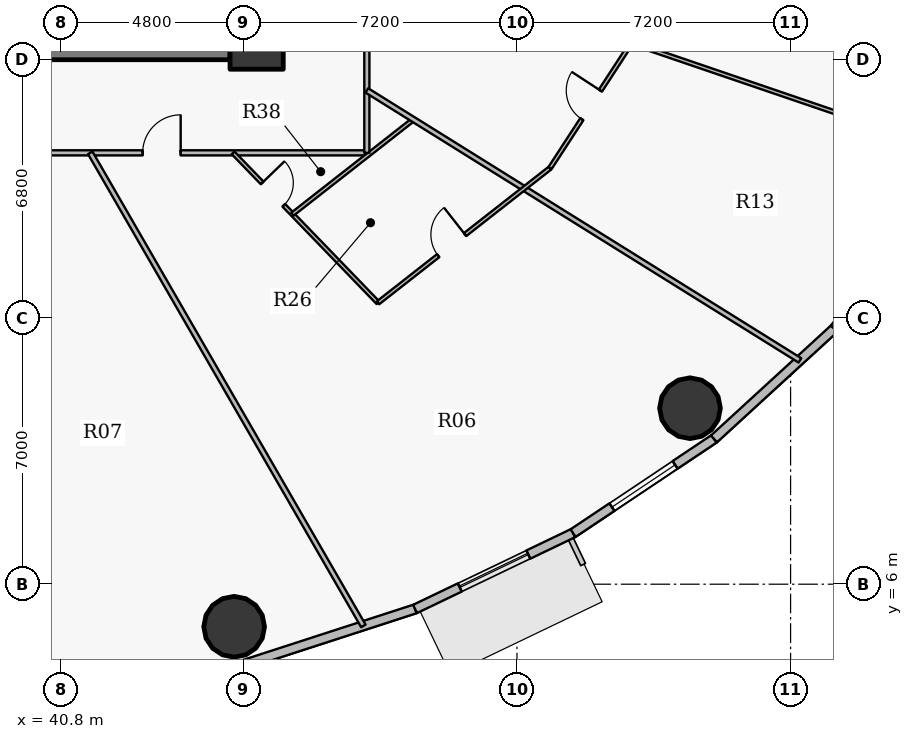
"""IFC4 building model, lengths in metres.
Left out: names, types, materials, properties, quantities, classifications, styles, units other than length and angle.
Written with IfcOpenShell. Run it as: python <this file> out.ifc"""

import sys

from ifc_helpers import new_model, si_unit, direction, frame, frame_2d, origin, origin_2d, place, context, subcontext, project, spatial, rectangle, hollow_circle, extrude, source, transform, mapped, element, fill, save


model = new_model("IFC4")
c1 = context("Model", 3, precision=1e-05, world=origin(), true_north=direction((0.0, 1.0)))
c2 = subcontext(c1, "Body", "Model", "MODEL_VIEW")
j1 = project(units=[si_unit("LENGTHUNIT", "METRE"), si_unit("PLANEANGLEUNIT", "RADIAN")], contexts=[c1])
p1 = place(None, origin())
s1 = spatial("IfcSite", under=j1, at=p1, CompositionType="ELEMENT")
p2 = place(p1, origin())
s2 = spatial("IfcBuilding", under=s1, at=p2, CompositionType="ELEMENT")
p3 = place(p2, frame((0.0, 0.0, 61.8)))
s3 = spatial("IfcBuildingStorey", under=s2, at=p3, CompositionType="ELEMENT", Elevation=61.8)
p4 = place(p3, frame((45.95, 20.25, 0.0), z_axis=(0.0, 0.0, 1.0), x_axis=(1.0, 0.0, 0.0)))
e1 = element("IfcColumn", 1, at=p4, inside=s3, PredefinedType="COLUMN", context=c2, shape_type="SweptSolid", body=[
    extrude(rectangle(XDim=1.4, YDim=1.4, at=origin_2d()), origin(), (0.0, 0.0, 1.0), 4.2),
])
p5 = place(p3, frame((45.25, 20.25, 0.0), z_axis=(0.0, 0.0, 1.0), x_axis=(-1.0, 0.0, 0.0)))
e2 = element("IfcWall", 2, at=p5, inside=s3, PredefinedType="SHEAR", context=c2, shape_type="SweptSolid", body=[
    extrude(rectangle(XDim=18.5, YDim=0.9, at=frame_2d((9.25, 0.0))), origin(), (0.0, 0.0, 1.0), 3.4),
])
p6 = place(p5, frame((10.0, 0.0, 0.0)))
e3 = element("IfcOpeningElement", 3, at=p6, cuts=e2, PredefinedType="OPENING", context=c2, shape_type="SweptSolid", body=[
    extrude(rectangle(XDim=1.15, YDim=2.15, at=origin_2d()), frame((0.575, 0.46, 1.075), z_axis=(0.0, -1.0, 0.0), x_axis=(1.0, 0.0, 0.0)), (0.0, 0.0, 1.0), 0.92),
])
for number, where, z_axis, x_axis in (
    (4, (45.358, 4.88, 0.0), (0.0, 0.0, 1.0), (1.0, 0.0, 0.0)),
    (5, (57.353, 10.631, 0.0), (0.0, 0.0, 1.0), (1.0, 0.0, 0.0)),
):
    element("IfcColumn", number, at=place(p3, frame(where, z_axis=z_axis, x_axis=x_axis)), inside=s3, PredefinedType="COLUMN", context=c2, shape_type="SweptSolid", body=[
        extrude(hollow_circle(Radius=0.8, WallThickness=0.045, at=origin_2d()), origin(), (0.0, 0.0, 1.0), 4.2),
    ])
p7 = place(p3, frame((50.118, 5.349, 0.0), z_axis=(0.0, 0.0, 1.0), x_axis=(-0.951207699013, -0.308551313946, 0.0)))
e6 = element("IfcWall", 6, at=p7, inside=s3, PredefinedType="SOLIDWALL", context=c2, shape_type="SweptSolid", body=[
    extrude(rectangle(XDim=4.739, YDim=0.24, at=frame_2d((2.369, 0.0))), origin(), (0.0, 0.0, 1.0), 3.95),
])
p8 = place(p3, frame((54.277, 7.344, 0.0), z_axis=(0.0, 0.0, 1.0), x_axis=(-0.901601503137, -0.432567601123, 0.0)))
e7 = element("IfcWall", 7, at=p8, inside=s3, PredefinedType="SOLIDWALL", context=c2, shape_type="SweptSolid", body=[
    extrude(rectangle(XDim=4.613, YDim=0.24, at=frame_2d((2.306, 0.0))), origin(), (0.0, 0.0, 1.0), 3.95),
])
p9 = place(p8, frame((1.307, 0.0, 0.9)))
e8 = element("IfcOpeningElement", 8, at=p9, cuts=e7, PredefinedType="OPENING", context=c2, shape_type="SweptSolid", body=[
    extrude(rectangle(XDim=2.0, YDim=1.75, at=origin_2d()), frame((1.0, 0.13, 0.875), z_axis=(0.0, -1.0, 0.0), x_axis=(1.0, 0.0, 0.0)), (0.0, 0.0, 1.0), 0.26),
])
p10 = place(p3, frame((57.985, 9.824, 0.0), z_axis=(0.0, 0.0, 1.0), x_axis=(-0.831240982525, -0.555912249343, 0.0)))
e9 = element("IfcWall", 9, at=p10, inside=s3, PredefinedType="SOLIDWALL", context=c2, shape_type="SweptSolid", body=[
    extrude(rectangle(XDim=4.46, YDim=0.24, at=frame_2d((2.23, 0.0))), origin(), (0.0, 0.0, 1.0), 3.95),
])
p11 = place(p10, frame((1.23, 0.0, 0.9)))
e10 = element("IfcOpeningElement", 10, at=p11, cuts=e9, PredefinedType="OPENING", context=c2, shape_type="SweptSolid", body=[
    extrude(rectangle(XDim=2.0, YDim=1.75, at=origin_2d()), frame((1.0, 0.13, 0.875), z_axis=(0.0, -1.0, 0.0), x_axis=(1.0, 0.0, 0.0)), (0.0, 0.0, 1.0), 0.26),
])
p12 = place(p3, frame((61.15, 12.725, 0.0), z_axis=(0.0, 0.0, 1.0), x_axis=(-0.737116376281, -0.67576582321, 0.0)))
e11 = element("IfcWall", 11, at=p12, inside=s3, PredefinedType="SOLIDWALL", context=c2, shape_type="SweptSolid", body=[
    extrude(rectangle(XDim=4.294, YDim=0.24, at=frame_2d((2.147, 0.0))), origin(), (0.0, 0.0, 1.0), 3.95),
])
p13 = place(p3, frame((63.695, 15.977, 0.0), z_axis=(0.0, 0.0, 1.0), x_axis=(-0.616295508253, -0.787514981767, 0.0)))
e12 = element("IfcWall", 12, at=p13, inside=s3, PredefinedType="SOLIDWALL", context=c2, shape_type="SweptSolid", body=[
    extrude(rectangle(XDim=4.129, YDim=0.24, at=frame_2d((2.065, 0.0))), origin(), (0.0, 0.0, 1.0), 3.95),
])
p14 = place(p13, frame((1.44, 0.0, 0.9)))
e13 = element("IfcOpeningElement", 13, at=p14, cuts=e12, PredefinedType="OPENING", context=c2, shape_type="SweptSolid", body=[
    extrude(rectangle(XDim=1.25, YDim=1.65, at=origin_2d()), frame((0.625, 0.13, 0.825), z_axis=(0.0, -1.0, 0.0), x_axis=(1.0, 0.0, 0.0)), (0.0, 0.0, 1.0), 0.26),
])
p15 = place(p3, frame((37.362, 17.35, 0.0), z_axis=(0.0, 0.0, 1.0), x_axis=(1.0, 0.0, 0.0)))
e14 = element("IfcWall", 14, at=p15, inside=s3, PredefinedType="PARTITIONING", context=c2, shape_type="SweptSolid", body=[
    extrude(rectangle(XDim=11.488, YDim=0.135, at=frame_2d((5.744, 0.0))), origin(), (0.0, 0.0, 1.0), 3.285),
])
p16 = place(p15, frame((1.625, 0.0, 0.0)))
e15 = element("IfcOpeningElement", 15, at=p16, cuts=e14, PredefinedType="OPENING", context=c2, shape_type="SweptSolid", body=[
    extrude(rectangle(XDim=1.0, YDim=2.15, at=origin_2d()), frame((0.5, 0.078, 1.075), z_axis=(0.0, -1.0, 0.0), x_axis=(1.0, 0.0, 0.0)), (0.0, 0.0, 1.0), 0.155),
])
p17 = place(p15, frame((5.589, 0.0, 0.0)))
e16 = element("IfcOpeningElement", 16, at=p17, cuts=e14, PredefinedType="OPENING", context=c2, shape_type="SweptSolid", body=[
    extrude(rectangle(XDim=1.0, YDim=2.15, at=origin_2d()), frame((0.5, 0.078, 1.075), z_axis=(0.0, -1.0, 0.0), x_axis=(1.0, 0.0, 0.0)), (0.0, 0.0, 1.0), 0.155),
])
p18 = place(p3, frame((41.572, 17.35, 0.0), z_axis=(0.0, 0.0, 1.0), x_axis=(0.499990052844, -0.866031146701, 0.0)))
e17 = element("IfcWall", 17, at=p18, inside=s3, PredefinedType="PARTITIONING", context=c2, shape_type="SweptSolid", body=[
    extrude(rectangle(XDim=14.373, YDim=0.135, at=frame_2d((7.187, 0.0))), origin(), (0.0, 0.0, 1.0), 3.335),
])
p19 = place(p3, frame((45.33, 17.35, 0.0), z_axis=(0.0, 0.0, 1.0), x_axis=(0.695082659364, -0.718929827348, 0.0)))
e18 = element("IfcWall", 18, at=p19, inside=s3, PredefinedType="PARTITIONING", context=c2, shape_type="SweptSolid", body=[
    extrude(rectangle(XDim=5.487, YDim=0.1, at=frame_2d((2.744, 0.0))), origin(), (0.0, 0.0, 1.0), 3.95),
])
p20 = place(p19, frame((1.1, 0.0, 0.0)))
e19 = element("IfcOpeningElement", 19, at=p20, cuts=e18, PredefinedType="OPENING", context=c2, shape_type="SweptSolid", body=[
    extrude(rectangle(XDim=0.82, YDim=2.1, at=origin_2d()), frame((0.41, 0.06, 1.05), z_axis=(0.0, -1.0, 0.0), x_axis=(1.0, 0.0, 0.0)), (0.0, 0.0, 1.0), 0.12),
])
p21 = place(p3, frame((46.891, 15.736, 0.0), z_axis=(0.0, 0.0, 1.0), x_axis=(0.787335515078, 0.61652476568, 0.0)))
e20 = element("IfcWall", 20, at=p21, inside=s3, PredefinedType="PARTITIONING", context=c2, shape_type="SweptSolid", body=[
    extrude(rectangle(XDim=4.043, YDim=0.1, at=frame_2d((2.022, 0.0))), origin(), (0.0, 0.0, 1.0), 3.285),
])
p22 = place(p3, frame((48.85, 17.35, 0.0), z_axis=(0.0, 0.0, 1.0), x_axis=(0.0, 1.0, 0.0)))
e21 = element("IfcWall", 21, at=p22, inside=s3, PredefinedType="PARTITIONING", context=c2, shape_type="SweptSolid", body=[
    extrude(rectangle(XDim=6.011, YDim=0.135, at=frame_2d((3.006, 0.0))), origin(), (0.0, 0.0, 1.0), 3.285),
])
p23 = place(p3, frame((48.85, 18.991, 0.0), z_axis=(0.0, 0.0, 1.0), x_axis=(0.848674864049, -0.528914903488, 0.0)))
e22 = element("IfcWall", 22, at=p23, inside=s3, PredefinedType="PARTITIONING", context=c2, shape_type="SweptSolid", body=[
    extrude(rectangle(XDim=13.427, YDim=0.135, at=frame_2d((6.714, 0.0))), origin(), (0.0, 0.0, 1.0), 3.335),
])
p24 = place(p3, frame((49.144, 13.405, 0.0), z_axis=(0.0, 0.0, 1.0), x_axis=(0.787337339938, 0.616522435228, 0.0)))
e23 = element("IfcWall", 23, at=p24, inside=s3, PredefinedType="PARTITIONING", context=c2, shape_type="SweptSolid", body=[
    extrude(rectangle(XDim=5.747, YDim=0.1, at=frame_2d((2.874, 0.0))), origin(), (0.0, 0.0, 1.0), 3.285),
])
p25 = place(p24, frame((2.01, 0.0, 0.0)))
e24 = element("IfcOpeningElement", 24, at=p25, cuts=e23, PredefinedType="OPENING", context=c2, shape_type="SweptSolid", body=[
    extrude(rectangle(XDim=0.9, YDim=2.1, at=origin_2d()), frame((0.45, 0.06, 1.05), z_axis=(0.0, -1.0, 0.0), x_axis=(1.0, 0.0, 0.0)), (0.0, 0.0, 1.0), 0.12),
])
p26 = place(p3, frame((53.669, 16.948, 0.0), z_axis=(0.0, 0.0, 1.0), x_axis=(0.545413765252, 0.8381669432, 0.0)))
e25 = element("IfcWall", 25, at=p26, inside=s3, PredefinedType="PARTITIONING", context=c2, shape_type="SweptSolid", body=[
    extrude(rectangle(XDim=5.688, YDim=0.1, at=frame_2d((2.844, 0.0))), origin(), (0.0, 0.0, 1.0), 3.285),
])
p27 = place(p26, frame((1.535, 0.0, 0.0)))
e26 = element("IfcOpeningElement", 26, at=p27, cuts=e25, PredefinedType="OPENING", context=c2, shape_type="SweptSolid", body=[
    extrude(rectangle(XDim=0.9, YDim=2.1, at=origin_2d()), frame((0.45, 0.06, 1.05), z_axis=(0.0, -1.0, 0.0), x_axis=(1.0, 0.0, 0.0)), (0.0, 0.0, 1.0), 0.12),
])
p28 = place(p3, frame((55.812, 20.242, 0.0), z_axis=(0.0, 0.0, 1.0), x_axis=(0.946449887069, -0.322850756955, 0.0)))
e27 = element("IfcWall", 27, at=p28, inside=s3, PredefinedType="PARTITIONING", context=c2, shape_type="SweptSolid", body=[
    extrude(rectangle(XDim=9.08, YDim=0.1, at=frame_2d((4.54, 0.0))), origin(), (0.0, 0.0, 1.0), 3.335),
])
p29 = place(p3, frame((45.26, 19.8, 0.0), z_axis=(0.0, 0.0, 1.0), x_axis=(1.0, 0.0, 0.0)))
e28 = element("IfcWall", 28, at=p29, inside=s3, PredefinedType="PARTITIONING", context=c2, shape_type="SweptSolid", body=[
    extrude(rectangle(XDim=1.14, YDim=0.135, at=frame_2d((0.57, 0.0))), origin(), (0.0, 0.0, 1.0), 3.285),
])
m1 = source(origin(), c2, "Body", "SweptSolid", [
    extrude(rectangle(XDim=2.0, YDim=1.75, at=origin_2d()), frame((1.0, 0.03, 0.875), z_axis=(0.0, -1.0, 0.0), x_axis=(1.0, 0.0, 0.0)), (0.0, 0.0, 1.0), 0.06),
])
p30 = place(p9, origin())
e29 = element("IfcWindow", 29, at=p30, inside=s3, PartitioningType="DOUBLE_PANEL_VERTICAL", PredefinedType="WINDOW", context=c2, shape_type="MappedRepresentation", body=[
    mapped(m1, transform((0.0, 0.0, 0.0), x_axis=(1.0, 0.0, 0.0), y_axis=(0.0, 1.0, 0.0), z_axis=(0.0, 0.0, 1.0), scale=1.0)),
])
fill(e8, e29)
p31 = place(p11, origin())
e30 = element("IfcWindow", 30, at=p31, inside=s3, PartitioningType="DOUBLE_PANEL_VERTICAL", PredefinedType="WINDOW", context=c2, shape_type="MappedRepresentation", body=[
    mapped(m1, transform((0.0, 0.0, 0.0), x_axis=(1.0, 0.0, 0.0), y_axis=(0.0, 1.0, 0.0), z_axis=(0.0, 0.0, 1.0), scale=1.0)),
])
fill(e10, e30)
m2 = source(origin(), c2, "Body", "SweptSolid", [
    extrude(rectangle(XDim=1.0, YDim=2.15, at=origin_2d()), frame((0.5, 0.025, 1.075), z_axis=(0.0, -1.0, 0.0), x_axis=(1.0, 0.0, 0.0)), (0.0, 0.0, 1.0), 0.05),
])
p32 = place(p17, origin())
e31 = element("IfcDoor", 31, at=p32, inside=s3, OperationType="SINGLE_SWING_RIGHT", PredefinedType="DOOR", context=c2, shape_type="MappedRepresentation", body=[
    mapped(m2, transform((0.0, 0.0, 0.0), x_axis=(1.0, 0.0, 0.0), y_axis=(0.0, 1.0, 0.0), z_axis=(0.0, 0.0, 1.0), scale=1.0)),
])
fill(e16, e31)
m3 = source(origin(), c2, "Body", "SweptSolid", [
    extrude(rectangle(XDim=0.82, YDim=2.1, at=origin_2d()), frame((0.41, 0.025, 1.05), z_axis=(0.0, -1.0, 0.0), x_axis=(1.0, 0.0, 0.0)), (0.0, 0.0, 1.0), 0.05),
])
p33 = place(p20, origin())
e32 = element("IfcDoor", 32, at=p33, inside=s3, OperationType="SINGLE_SWING_LEFT", PredefinedType="DOOR", context=c2, shape_type="MappedRepresentation", body=[
    mapped(m3, transform((0.0, 0.0, 0.0), x_axis=(1.0, 0.0, 0.0), y_axis=(0.0, 1.0, 0.0), z_axis=(0.0, 0.0, 1.0), scale=1.0)),
])
fill(e19, e32)
m4 = source(origin(), c2, "Body", "SweptSolid", [
    extrude(rectangle(XDim=0.9, YDim=2.1, at=origin_2d()), frame((0.45, 0.025, 1.05), z_axis=(0.0, -1.0, 0.0), x_axis=(1.0, 0.0, 0.0)), (0.0, 0.0, 1.0), 0.05),
])
p34 = place(p25, origin())
e33 = element("IfcDoor", 33, at=p34, inside=s3, OperationType="SINGLE_SWING_RIGHT", PredefinedType="DOOR", context=c2, shape_type="MappedRepresentation", body=[
    mapped(m4, transform((0.0, 0.0, 0.0), x_axis=(1.0, 0.0, 0.0), y_axis=(0.0, 1.0, 0.0), z_axis=(0.0, 0.0, 1.0), scale=1.0)),
])
fill(e24, e33)
p35 = place(p27, origin())
e34 = element("IfcDoor", 34, at=p35, inside=s3, OperationType="SINGLE_SWING_RIGHT", PredefinedType="DOOR", context=c2, shape_type="MappedRepresentation", body=[
    mapped(m4, transform((0.0, 0.0, 0.0), x_axis=(1.0, 0.0, 0.0), y_axis=(0.0, 1.0, 0.0), z_axis=(0.0, 0.0, 1.0), scale=1.0)),
])
fill(e26, e34)
save(model, sys.argv[1])
